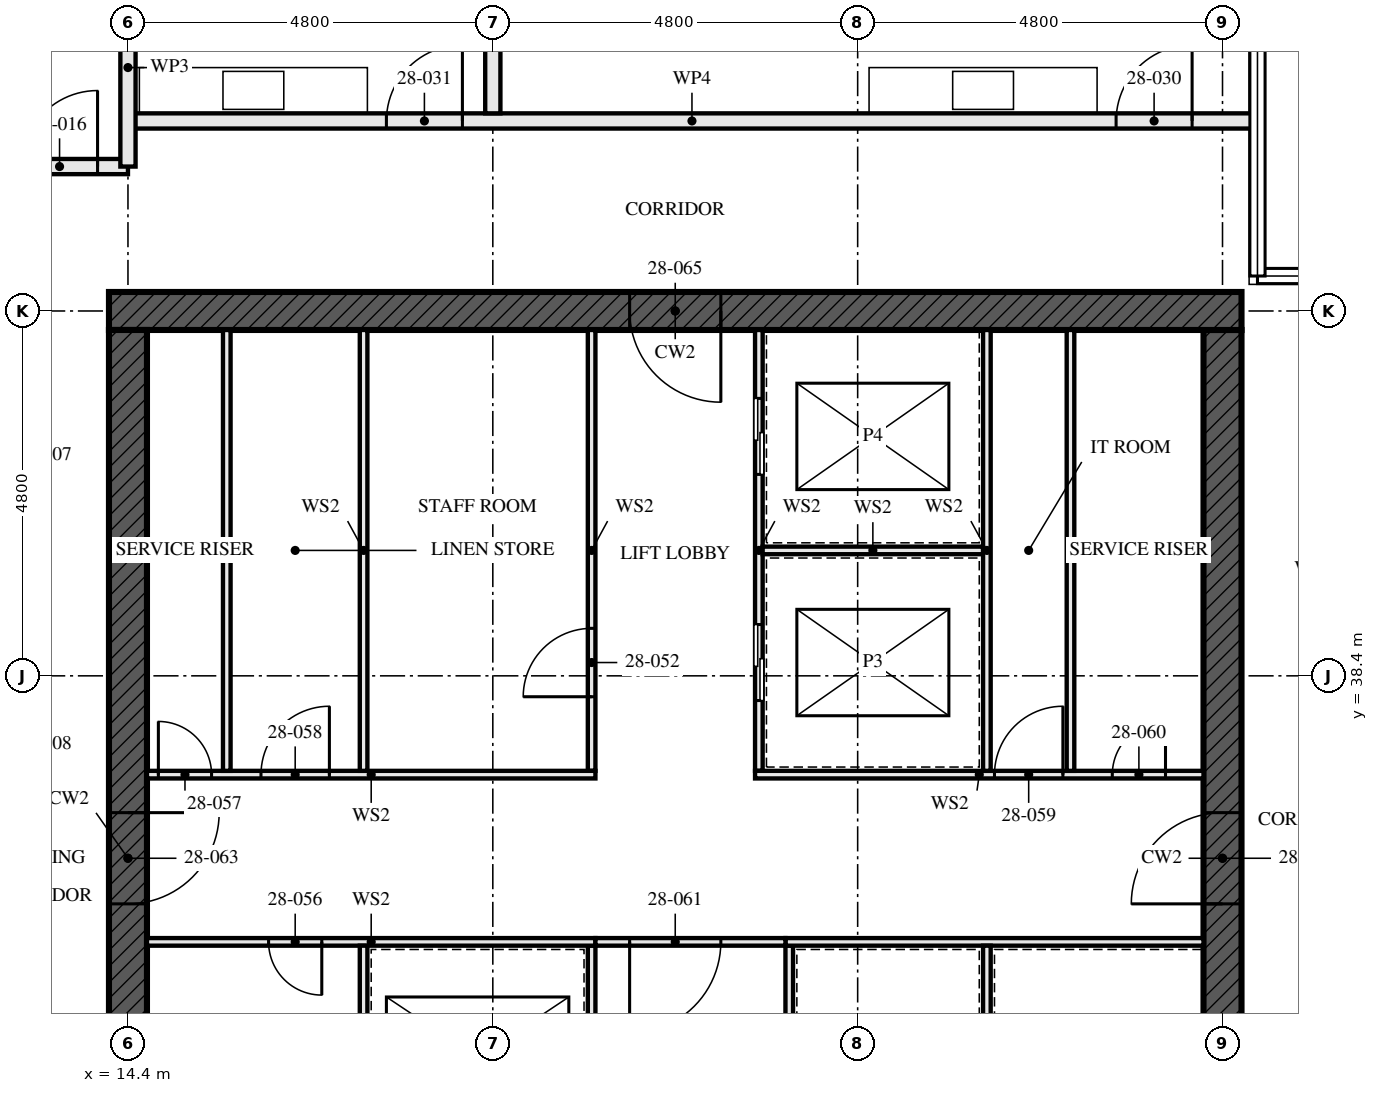
"""IFC4 building model, lengths in metres.
Left out: names, types, materials, properties, quantities, classifications, styles, units other than length and angle.
Written with IfcOpenShell. Run it as: python <this file> out.ifc"""

import sys

from ifc_helpers import new_model, si_unit, direction, frame, frame_2d, origin, place, context, subcontext, project, spatial, rectangle, extrude, element, fill, save


model = new_model("IFC4")
c1 = context("Model", 3, precision=1e-05, world=origin(), true_north=direction((0.0, 1.0)))
c2 = subcontext(c1, "Body", "Model", "MODEL_VIEW")
j1 = project(units=[si_unit("LENGTHUNIT", "METRE"), si_unit("PLANEANGLEUNIT", "RADIAN")], contexts=[c1])
p1 = place(None, origin())
s1 = spatial("IfcSite", under=j1, at=p1, CompositionType="ELEMENT")
p2 = place(p1, origin())
s2 = spatial("IfcBuilding", under=s1, at=p2, CompositionType="ELEMENT")
p3 = place(p2, frame((0.0, 0.0, 105.0)))
s3 = spatial("IfcBuildingStorey", under=s2, at=p3, CompositionType="ELEMENT", Elevation=105.0)
p4 = place(p3, frame((29.05, 43.2, -0.17), z_axis=(0.0, 0.0, 1.0), x_axis=(-1.0, 0.0, 0.0)))
e1 = element("IfcWall", 1, at=p4, inside=s3, PredefinedType="SHEAR", context=c2, shape_type="SweptSolid", body=[
    extrude(rectangle(XDim=14.9, YDim=0.5, at=frame_2d((7.45, 0.0))), origin(), (0.0, 0.0, 1.0), 3.5),
])
p5 = place(p4, frame((6.85, 0.0, 0.17)))
e2 = element("IfcOpeningElement", 2, at=p5, cuts=e1, PredefinedType="OPENING", context=c2, shape_type="SweptSolid", body=[
    extrude(rectangle(XDim=1.2, YDim=2.1, at=frame_2d((0.6, 1.05))), frame((0.0, 0.26, 0.0), z_axis=(0.0, -1.0, 0.0), x_axis=(1.0, 0.0, 0.0)), (0.0, 0.0, 1.0), 0.521),
])
p6 = place(p3, frame((14.4, 42.95, -0.17), z_axis=(0.0, 0.0, 1.0), x_axis=(0.0, -1.0, 0.0)))
e3 = element("IfcWall", 3, at=p6, inside=s3, PredefinedType="SHEAR", context=c2, shape_type="SweptSolid", body=[
    extrude(rectangle(XDim=13.9, YDim=0.5, at=frame_2d((6.95, 0.0))), origin(), (0.0, 0.0, 1.0), 3.5),
])
p7 = place(p6, frame((6.35, 0.0, 0.17)))
e4 = element("IfcOpeningElement", 4, at=p7, cuts=e3, PredefinedType="OPENING", context=c2, shape_type="SweptSolid", body=[
    extrude(rectangle(XDim=1.2, YDim=2.1, at=frame_2d((0.6, 1.05))), frame((0.0, 0.26, 0.0), z_axis=(0.0, -1.0, 0.0), x_axis=(1.0, 0.0, 0.0)), (0.0, 0.0, 1.0), 0.521),
])
p8 = place(p3, frame((28.8, 29.05, -0.17), z_axis=(0.0, 0.0, 1.0), x_axis=(0.0, 1.0, 0.0)))
e5 = element("IfcWall", 5, at=p8, inside=s3, PredefinedType="SHEAR", context=c2, shape_type="SweptSolid", body=[
    extrude(rectangle(XDim=13.9, YDim=0.5, at=frame_2d((6.95, 0.0))), origin(), (0.0, 0.0, 1.0), 3.5),
])
p9 = place(p8, frame((6.35, 0.0, 0.17)))
e6 = element("IfcOpeningElement", 6, at=p9, cuts=e5, PredefinedType="OPENING", context=c2, shape_type="SweptSolid", body=[
    extrude(rectangle(XDim=1.2, YDim=2.1, at=frame_2d((0.6, 1.05))), frame((0.0, 0.26, 0.0), z_axis=(0.0, -1.0, 0.0), x_axis=(1.0, 0.0, 0.0)), (0.0, 0.0, 1.0), 0.521),
])
p10 = place(p3, frame((14.4, 45.1, 0.0), z_axis=(0.0, 0.0, 1.0), x_axis=(-1.0, 0.0, 0.0)))
e7 = element("IfcWall", 7, at=p10, inside=s3, PredefinedType="PARTITIONING", context=c2, shape_type="SweptSolid", body=[
    extrude(rectangle(XDim=9.6, YDim=0.2, at=frame_2d((4.8, 0.0))), origin(), (0.0, 0.0, 1.0), 3.33),
])
p11 = place(p10, frame((0.4, 0.0, 0.0)))
e8 = element("IfcOpeningElement", 8, at=p11, cuts=e7, PredefinedType="OPENING", context=c2, shape_type="SweptSolid", body=[
    extrude(rectangle(XDim=1.0, YDim=2.1, at=frame_2d((0.5, 1.05))), frame((0.0, 0.111, 0.0), z_axis=(0.0, -1.0, 0.0), x_axis=(1.0, 0.0, 0.0)), (0.0, 0.0, 1.0), 0.221),
])
p12 = place(p10, frame((5.2, 0.0, 0.0)))
e9 = element("IfcOpeningElement", 9, at=p12, cuts=e7, PredefinedType="OPENING", context=c2, shape_type="SweptSolid", body=[
    extrude(rectangle(XDim=1.0, YDim=2.1, at=frame_2d((0.5, 1.05))), frame((0.0, 0.111, 0.0), z_axis=(0.0, -1.0, 0.0), x_axis=(1.0, 0.0, 0.0)), (0.0, 0.0, 1.0), 0.221),
])
p13 = place(p3, frame((19.2, 57.28, 0.0), z_axis=(0.0, 0.0, 1.0), x_axis=(0.0, -1.0, 0.0)))
e10 = element("IfcWall", 10, at=p13, inside=s3, PredefinedType="PARTITIONING", context=c2, shape_type="SweptSolid", body=[
    extrude(rectangle(XDim=11.48, YDim=0.2, at=frame_2d((5.74, 0.0))), origin(), (0.0, 0.0, 1.0), 2.55),
])
p14 = place(p3, frame((29.24, 45.7, 0.0), z_axis=(0.0, 0.0, 1.0), x_axis=(-1.0, 0.0, 0.0)))
e11 = element("IfcWall", 11, at=p14, inside=s3, PredefinedType="PARTITIONING", context=c2, shape_type="SweptSolid", body=[
    extrude(rectangle(XDim=14.84, YDim=0.2, at=frame_2d((7.42, 0.0))), origin(), (0.0, 0.0, 1.0), 2.32),
])
p15 = place(p14, frame((0.84, 0.0, 0.0)))
e12 = element("IfcOpeningElement", 12, at=p15, cuts=e11, PredefinedType="OPENING", context=c2, shape_type="SweptSolid", body=[
    extrude(rectangle(XDim=1.0, YDim=2.1, at=frame_2d((0.5, 1.05))), frame((0.0, 0.111, 0.0), z_axis=(0.0, -1.0, 0.0), x_axis=(1.0, 0.0, 0.0)), (0.0, 0.0, 1.0), 0.221),
])
p16 = place(p14, frame((10.44, 0.0, 0.0)))
e13 = element("IfcOpeningElement", 13, at=p16, cuts=e11, PredefinedType="OPENING", context=c2, shape_type="SweptSolid", body=[
    extrude(rectangle(XDim=1.0, YDim=2.1, at=frame_2d((0.5, 1.05))), frame((0.0, 0.111, 0.0), z_axis=(0.0, -1.0, 0.0), x_axis=(1.0, 0.0, 0.0)), (0.0, 0.0, 1.0), 0.221),
])
for number, where, z_axis, x_axis in (
    (14, (15.7, 37.15, 0.0), (0.0, 0.0, 1.0), (0.0, 1.0, 0.0)),
    (15, (26.8, 37.15, 0.0), (0.0, 0.0, 1.0), (0.0, 1.0, 0.0)),
):
    element("IfcWall", number, at=place(p3, frame(where, z_axis=z_axis, x_axis=x_axis)), inside=s3, PredefinedType="SOLIDWALL", context=c2, shape_type="SweptSolid", body=[
        extrude(rectangle(XDim=5.8, YDim=0.1, at=frame_2d((2.9, 0.0))), origin(), (0.0, 0.0, 1.0), 3.33),
    ])
p17 = place(p3, frame((20.5, 29.05, 0.0), z_axis=(0.0, 0.0, 1.0), x_axis=(0.0, 1.0, 0.0)))
e16 = element("IfcWall", 16, at=p17, inside=s3, PredefinedType="SOLIDWALL", context=c2, shape_type="SweptSolid", body=[
    extrude(rectangle(XDim=5.8, YDim=0.1, at=frame_2d((2.9, 0.0))), origin(), (0.0, 0.0, 1.0), 3.33),
])
p18 = place(p17, frame((0.8, 0.0, 0.0)))
e17 = element("IfcOpeningElement", 17, at=p18, cuts=e16, PredefinedType="OPENING", context=c2, shape_type="SweptSolid", body=[
    extrude(rectangle(XDim=1.1, YDim=2.3, at=frame_2d((0.55, 1.15))), frame((0.0, 0.061, 0.0), z_axis=(0.0, -1.0, 0.0), x_axis=(1.0, 0.0, 0.0)), (0.0, 0.0, 1.0), 0.121),
])
p19 = place(p17, frame((3.775, 0.0, 0.0)))
e18 = element("IfcOpeningElement", 18, at=p19, cuts=e16, PredefinedType="OPENING", context=c2, shape_type="SweptSolid", body=[
    extrude(rectangle(XDim=1.1, YDim=2.3, at=frame_2d((0.55, 1.15))), frame((0.0, 0.061, 0.0), z_axis=(0.0, -1.0, 0.0), x_axis=(1.0, 0.0, 0.0)), (0.0, 0.0, 1.0), 0.121),
])
p20 = place(p3, frame((20.5, 37.15, 0.0), z_axis=(0.0, 0.0, 1.0), x_axis=(0.0, 1.0, 0.0)))
e19 = element("IfcWall", 19, at=p20, inside=s3, PredefinedType="SOLIDWALL", context=c2, shape_type="SweptSolid", body=[
    extrude(rectangle(XDim=5.8, YDim=0.1, at=frame_2d((2.9, 0.0))), origin(), (0.0, 0.0, 1.0), 3.33),
])
p21 = place(p20, frame((0.975, 0.0, 0.0)))
e20 = element("IfcOpeningElement", 20, at=p21, cuts=e19, PredefinedType="OPENING", context=c2, shape_type="SweptSolid", body=[
    extrude(rectangle(XDim=0.9, YDim=2.1, at=frame_2d((0.45, 1.05))), frame((0.0, 0.061, 0.0), z_axis=(0.0, -1.0, 0.0), x_axis=(1.0, 0.0, 0.0)), (0.0, 0.0, 1.0), 0.121),
])
p22 = place(p3, frame((22.7, 37.15, 0.0), z_axis=(0.0, 0.0, 1.0), x_axis=(0.0, 1.0, 0.0)))
e21 = element("IfcWall", 21, at=p22, inside=s3, PredefinedType="SOLIDWALL", context=c2, shape_type="SweptSolid", body=[
    extrude(rectangle(XDim=5.8, YDim=0.1, at=frame_2d((2.9, 0.0))), origin(), (0.0, 0.0, 1.0), 3.33),
])
p23 = place(p22, frame((0.925, 0.0, 0.0)))
e22 = element("IfcOpeningElement", 22, at=p23, cuts=e21, PredefinedType="OPENING", context=c2, shape_type="SweptSolid", body=[
    extrude(rectangle(XDim=1.0, YDim=2.1, at=frame_2d((0.5, 1.05))), frame((0.0, 0.061, 0.0), z_axis=(0.0, -1.0, 0.0), x_axis=(1.0, 0.0, 0.0)), (0.0, 0.0, 1.0), 0.121),
])
p24 = place(p22, frame((3.9, 0.0, 0.0)))
e23 = element("IfcOpeningElement", 23, at=p24, cuts=e21, PredefinedType="OPENING", context=c2, shape_type="SweptSolid", body=[
    extrude(rectangle(XDim=1.0, YDim=2.1, at=frame_2d((0.5, 1.05))), frame((0.0, 0.061, 0.0), z_axis=(0.0, -1.0, 0.0), x_axis=(1.0, 0.0, 0.0)), (0.0, 0.0, 1.0), 0.121),
])
p25 = place(p3, frame((23.1, 29.05, 0.0), z_axis=(0.0, 0.0, 1.0), x_axis=(0.0, 1.0, 0.0)))
e24 = element("IfcWall", 24, at=p25, inside=s3, PredefinedType="SOLIDWALL", context=c2, shape_type="SweptSolid", body=[
    extrude(rectangle(XDim=5.8, YDim=0.1, at=frame_2d((2.9, 0.0))), origin(), (0.0, 0.0, 1.0), 3.33),
])
p26 = place(p25, frame((1.0, 0.0, 0.0)))
e25 = element("IfcOpeningElement", 25, at=p26, cuts=e24, PredefinedType="OPENING", context=c2, shape_type="SweptSolid", body=[
    extrude(rectangle(XDim=0.7, YDim=2.1, at=frame_2d((0.35, 1.05))), frame((0.0, 0.061, 0.0), z_axis=(0.0, -1.0, 0.0), x_axis=(1.0, 0.0, 0.0)), (0.0, 0.0, 1.0), 0.121),
])
p27 = place(p3, frame((14.65, 34.9, 0.0), z_axis=(0.0, 0.0, 1.0), x_axis=(1.0, 0.0, 0.0)))
e26 = element("IfcWall", 26, at=p27, inside=s3, PredefinedType="SOLIDWALL", context=c2, shape_type="SweptSolid", body=[
    extrude(rectangle(XDim=5.9, YDim=0.1, at=frame_2d((2.95, 0.0))), origin(), (0.0, 0.0, 1.0), 3.33),
])
p28 = place(p27, frame((1.6, 0.0, 0.0)))
e27 = element("IfcOpeningElement", 27, at=p28, cuts=e26, PredefinedType="OPENING", context=c2, shape_type="SweptSolid", body=[
    extrude(rectangle(XDim=0.7, YDim=2.1, at=frame_2d((0.35, 1.05))), frame((0.0, 0.061, 0.0), z_axis=(0.0, -1.0, 0.0), x_axis=(1.0, 0.0, 0.0)), (0.0, 0.0, 1.0), 0.121),
])
p29 = place(p3, frame((23.05, 34.9, 0.0), z_axis=(0.0, 0.0, 1.0), x_axis=(1.0, 0.0, 0.0)))
e28 = element("IfcWall", 28, at=p29, inside=s3, PredefinedType="SOLIDWALL", context=c2, shape_type="SweptSolid", body=[
    extrude(rectangle(XDim=5.5, YDim=0.1, at=frame_2d((2.75, 0.0))), origin(), (0.0, 0.0, 1.0), 3.33),
])
p30 = place(p3, frame((14.65, 37.1, 0.0), z_axis=(0.0, 0.0, 1.0), x_axis=(1.0, 0.0, 0.0)))
e29 = element("IfcWall", 29, at=p30, inside=s3, PredefinedType="SOLIDWALL", context=c2, shape_type="SweptSolid", body=[
    extrude(rectangle(XDim=5.9, YDim=0.1, at=frame_2d((2.95, 0.0))), origin(), (0.0, 0.0, 1.0), 3.33),
])
p31 = place(p30, frame((0.15, 0.0, 0.0)))
e30 = element("IfcOpeningElement", 30, at=p31, cuts=e29, PredefinedType="OPENING", context=c2, shape_type="SweptSolid", body=[
    extrude(rectangle(XDim=0.7, YDim=2.1, at=frame_2d((0.35, 1.05))), frame((0.0, 0.061, 0.0), z_axis=(0.0, -1.0, 0.0), x_axis=(1.0, 0.0, 0.0)), (0.0, 0.0, 1.0), 0.121),
])
p32 = place(p30, frame((1.5, 0.0, 0.0)))
e31 = element("IfcOpeningElement", 31, at=p32, cuts=e29, PredefinedType="OPENING", context=c2, shape_type="SweptSolid", body=[
    extrude(rectangle(XDim=0.9, YDim=2.1, at=frame_2d((0.45, 1.05))), frame((0.0, 0.061, 0.0), z_axis=(0.0, -1.0, 0.0), x_axis=(1.0, 0.0, 0.0)), (0.0, 0.0, 1.0), 0.121),
])
p33 = place(p3, frame((22.65, 37.1, 0.0), z_axis=(0.0, 0.0, 1.0), x_axis=(1.0, 0.0, 0.0)))
e32 = element("IfcWall", 32, at=p33, inside=s3, PredefinedType="SOLIDWALL", context=c2, shape_type="SweptSolid", body=[
    extrude(rectangle(XDim=5.9, YDim=0.1, at=frame_2d((2.95, 0.0))), origin(), (0.0, 0.0, 1.0), 3.33),
])
p34 = place(p33, frame((3.15, 0.0, 0.0)))
e33 = element("IfcOpeningElement", 33, at=p34, cuts=e32, PredefinedType="OPENING", context=c2, shape_type="SweptSolid", body=[
    extrude(rectangle(XDim=0.9, YDim=2.1, at=frame_2d((0.45, 1.05))), frame((0.0, 0.061, 0.0), z_axis=(0.0, -1.0, 0.0), x_axis=(1.0, 0.0, 0.0)), (0.0, 0.0, 1.0), 0.121),
])
p35 = place(p33, frame((4.7, 0.0, 0.0)))
e34 = element("IfcOpeningElement", 34, at=p35, cuts=e32, PredefinedType="OPENING", context=c2, shape_type="SweptSolid", body=[
    extrude(rectangle(XDim=0.7, YDim=2.1, at=frame_2d((0.35, 1.05))), frame((0.0, 0.061, 0.0), z_axis=(0.0, -1.0, 0.0), x_axis=(1.0, 0.0, 0.0)), (0.0, 0.0, 1.0), 0.121),
])
p36 = place(p3, frame((20.55, 34.9, 0.0), z_axis=(0.0, 0.0, 1.0), x_axis=(1.0, 0.0, 0.0)))
e35 = element("IfcWall", 35, at=p36, inside=s3, PredefinedType="SOLIDWALL", context=c2, shape_type="SweptSolid", body=[
    extrude(rectangle(XDim=2.5, YDim=0.1, at=frame_2d((1.25, 0.0))), origin(), (0.0, 0.0, 1.0), 3.33),
])
p37 = place(p36, frame((0.45, 0.0, 0.0)))
e36 = element("IfcOpeningElement", 36, at=p37, cuts=e35, PredefinedType="OPENING", context=c2, shape_type="SweptSolid", body=[
    extrude(rectangle(XDim=1.2, YDim=2.1, at=frame_2d((0.6, 1.05))), frame((0.0, 0.061, 0.0), z_axis=(0.0, -1.0, 0.0), x_axis=(1.0, 0.0, 0.0)), (0.0, 0.0, 1.0), 0.121),
])
for number, where, z_axis, x_axis in (
    (37, (17.5, 29.05, 0.0), (0.0, 0.0, 1.0), (0.0, 1.0, 0.0)),
    (38, (17.5, 37.15, 0.0), (0.0, 0.0, 1.0), (0.0, 1.0, 0.0)),
):
    element("IfcWall", number, at=place(p3, frame(where, z_axis=z_axis, x_axis=x_axis)), inside=s3, PredefinedType="SOLIDWALL", context=c2, shape_type="SweptSolid", body=[
        extrude(rectangle(XDim=5.8, YDim=0.1, at=frame_2d((2.9, 0.0))), origin(), (0.0, 0.0, 1.0), 3.33),
    ])
p38 = place(p3, frame((22.75, 40.05, 0.0), z_axis=(0.0, 0.0, 1.0), x_axis=(1.0, 0.0, 0.0)))
e39 = element("IfcWall", 39, at=p38, inside=s3, PredefinedType="SOLIDWALL", context=c2, shape_type="SweptSolid", body=[
    extrude(rectangle(XDim=2.9, YDim=0.1, at=frame_2d((1.45, 0.0))), origin(), (0.0, 0.0, 1.0), 3.33),
])
p39 = place(p3, frame((25.7, 37.15, 0.0), z_axis=(0.0, 0.0, 1.0), x_axis=(0.0, 1.0, 0.0)))
e40 = element("IfcWall", 40, at=p39, inside=s3, PredefinedType="SOLIDWALL", context=c2, shape_type="SweptSolid", body=[
    extrude(rectangle(XDim=5.8, YDim=0.1, at=frame_2d((2.9, 0.0))), origin(), (0.0, 0.0, 1.0), 3.33),
])
p40 = place(p3, frame((25.7, 31.95, 0.0), z_axis=(0.0, 0.0, 1.0), x_axis=(0.0, 1.0, 0.0)))
e41 = element("IfcWall", 41, at=p40, inside=s3, PredefinedType="SOLIDWALL", context=c2, shape_type="SweptSolid", body=[
    extrude(rectangle(XDim=2.9, YDim=0.1, at=frame_2d((1.45, 0.0))), origin(), (0.0, 0.0, 1.0), 3.33),
])
p41 = place(p3, frame((14.4, 45.1, 0.0), z_axis=(0.0, 0.0, 1.0), x_axis=(0.0, 1.0, 0.0)))
e42 = element("IfcWall", 42, at=p41, inside=s3, PredefinedType="PARTITIONING", context=c2, shape_type="SweptSolid", body=[
    extrude(rectangle(XDim=2.605, YDim=0.2, at=frame_2d((1.302, 0.0))), origin(), (0.0, 0.0, 1.0), 2.32),
])
p42 = place(p11, frame((1.0, 0.0, 0.0), z_axis=(0.0, 0.0, 1.0), x_axis=(-1.0, 0.0, 0.0)))
e43 = element("IfcDoor", 43, at=p42, inside=s3, OperationType="SINGLE_SWING_LEFT", PredefinedType="DOOR", context=c2, shape_type="SweptSolid", body=[
    extrude(rectangle(XDim=1.0, YDim=2.1, at=frame_2d((0.5, 1.05))), frame((0.0, 0.027, 0.0), z_axis=(0.0, -1.0, 0.0), x_axis=(1.0, 0.0, 0.0)), (0.0, 0.0, 1.0), 0.054),
])
fill(e8, e43)
p43 = place(p15, frame((1.0, 0.0, 0.0), z_axis=(0.0, 0.0, 1.0), x_axis=(-1.0, 0.0, 0.0)))
e44 = element("IfcDoor", 44, at=p43, inside=s3, OperationType="SINGLE_SWING_LEFT", PredefinedType="DOOR", context=c2, shape_type="SweptSolid", body=[
    extrude(rectangle(XDim=1.0, YDim=2.1, at=frame_2d((0.5, 1.05))), frame((0.0, 0.027, 0.0), z_axis=(0.0, -1.0, 0.0), x_axis=(1.0, 0.0, 0.0)), (0.0, 0.0, 1.0), 0.054),
])
fill(e12, e44)
p44 = place(p16, frame((1.0, 0.0, 0.0), z_axis=(0.0, 0.0, 1.0), x_axis=(-1.0, 0.0, 0.0)))
e45 = element("IfcDoor", 45, at=p44, inside=s3, OperationType="SINGLE_SWING_LEFT", PredefinedType="DOOR", context=c2, shape_type="SweptSolid", body=[
    extrude(rectangle(XDim=1.0, YDim=2.1, at=frame_2d((0.5, 1.05))), frame((0.0, 0.027, 0.0), z_axis=(0.0, -1.0, 0.0), x_axis=(1.0, 0.0, 0.0)), (0.0, 0.0, 1.0), 0.054),
])
fill(e13, e45)
p45 = place(p21, origin())
e46 = element("IfcDoor", 46, at=p45, inside=s3, OperationType="SINGLE_SWING_RIGHT", PredefinedType="DOOR", context=c2, shape_type="SweptSolid", body=[
    extrude(rectangle(XDim=0.9, YDim=2.1, at=frame_2d((0.45, 1.05))), frame((0.0, 0.027, 0.0), z_axis=(0.0, -1.0, 0.0), x_axis=(1.0, 0.0, 0.0)), (0.0, 0.0, 1.0), 0.054),
])
fill(e20, e46)
p46 = place(p23, origin())
e47 = element("IfcDoor", 47, at=p46, inside=s3, OperationType="SLIDING_TO_LEFT", PredefinedType="DOOR", context=c2, shape_type="SweptSolid", body=[
    extrude(rectangle(XDim=1.0, YDim=2.1, at=frame_2d((0.5, 1.05))), frame((0.0, 0.05, 0.0), z_axis=(0.0, -1.0, 0.0), x_axis=(1.0, 0.0, 0.0)), (0.0, 0.0, 1.0), 0.1),
])
fill(e22, e47)
p47 = place(p24, origin())
e48 = element("IfcDoor", 48, at=p47, inside=s3, OperationType="SLIDING_TO_LEFT", PredefinedType="DOOR", context=c2, shape_type="SweptSolid", body=[
    extrude(rectangle(XDim=1.0, YDim=2.1, at=frame_2d((0.5, 1.05))), frame((0.0, 0.05, 0.0), z_axis=(0.0, -1.0, 0.0), x_axis=(1.0, 0.0, 0.0)), (0.0, 0.0, 1.0), 0.1),
])
fill(e23, e48)
p48 = place(p28, frame((0.7, 0.0, 0.0), z_axis=(0.0, 0.0, 1.0), x_axis=(-1.0, 0.0, 0.0)))
e49 = element("IfcDoor", 49, at=p48, inside=s3, OperationType="SINGLE_SWING_RIGHT", PredefinedType="DOOR", context=c2, shape_type="SweptSolid", body=[
    extrude(rectangle(XDim=0.7, YDim=2.1, at=frame_2d((0.35, 1.05))), frame((0.0, 0.027, 0.0), z_axis=(0.0, -1.0, 0.0), x_axis=(1.0, 0.0, 0.0)), (0.0, 0.0, 1.0), 0.054),
])
fill(e27, e49)
p49 = place(p31, origin())
e50 = element("IfcDoor", 50, at=p49, inside=s3, OperationType="SINGLE_SWING_RIGHT", PredefinedType="DOOR", context=c2, shape_type="SweptSolid", body=[
    extrude(rectangle(XDim=0.7, YDim=2.1, at=frame_2d((0.35, 1.05))), frame((0.0, 0.027, 0.0), z_axis=(0.0, -1.0, 0.0), x_axis=(1.0, 0.0, 0.0)), (0.0, 0.0, 1.0), 0.054),
])
fill(e30, e50)
p50 = place(p32, origin())
e51 = element("IfcDoor", 51, at=p50, inside=s3, OperationType="SINGLE_SWING_LEFT", PredefinedType="DOOR", context=c2, shape_type="SweptSolid", body=[
    extrude(rectangle(XDim=0.9, YDim=2.1, at=frame_2d((0.45, 1.05))), frame((0.0, 0.027, 0.0), z_axis=(0.0, -1.0, 0.0), x_axis=(1.0, 0.0, 0.0)), (0.0, 0.0, 1.0), 0.054),
])
fill(e31, e51)
p51 = place(p34, origin())
e52 = element("IfcDoor", 52, at=p51, inside=s3, OperationType="SINGLE_SWING_LEFT", PredefinedType="DOOR", context=c2, shape_type="SweptSolid", body=[
    extrude(rectangle(XDim=0.9, YDim=2.1, at=frame_2d((0.45, 1.05))), frame((0.0, 0.027, 0.0), z_axis=(0.0, -1.0, 0.0), x_axis=(1.0, 0.0, 0.0)), (0.0, 0.0, 1.0), 0.054),
])
fill(e33, e52)
p52 = place(p35, origin())
e53 = element("IfcDoor", 53, at=p52, inside=s3, OperationType="SINGLE_SWING_LEFT", PredefinedType="DOOR", context=c2, shape_type="SweptSolid", body=[
    extrude(rectangle(XDim=0.7, YDim=2.1, at=frame_2d((0.35, 1.05))), frame((0.0, 0.027, 0.0), z_axis=(0.0, -1.0, 0.0), x_axis=(1.0, 0.0, 0.0)), (0.0, 0.0, 1.0), 0.054),
])
fill(e34, e53)
p53 = place(p37, frame((1.2, 0.0, 0.0), z_axis=(0.0, 0.0, 1.0), x_axis=(-1.0, 0.0, 0.0)))
e54 = element("IfcDoor", 54, at=p53, inside=s3, OperationType="SINGLE_SWING_LEFT", PredefinedType="DOOR", context=c2, shape_type="SweptSolid", body=[
    extrude(rectangle(XDim=1.2, YDim=2.1, at=frame_2d((0.6, 1.05))), frame((0.0, 0.027, 0.0), z_axis=(0.0, -1.0, 0.0), x_axis=(1.0, 0.0, 0.0)), (0.0, 0.0, 1.0), 0.054),
])
fill(e36, e54)
p54 = place(p7, origin())
e55 = element("IfcDoor", 55, at=p54, inside=s3, OperationType="SINGLE_SWING_LEFT", PredefinedType="DOOR", context=c2, shape_type="SweptSolid", body=[
    extrude(rectangle(XDim=1.2, YDim=2.1, at=frame_2d((0.6, 1.05))), frame((0.0, 0.027, 0.0), z_axis=(0.0, -1.0, 0.0), x_axis=(1.0, 0.0, 0.0)), (0.0, 0.0, 1.0), 0.054),
])
fill(e4, e55)
p55 = place(p9, origin())
e56 = element("IfcDoor", 56, at=p55, inside=s3, OperationType="SINGLE_SWING_LEFT", PredefinedType="DOOR", context=c2, shape_type="SweptSolid", body=[
    extrude(rectangle(XDim=1.2, YDim=2.1, at=frame_2d((0.6, 1.05))), frame((0.0, 0.027, 0.0), z_axis=(0.0, -1.0, 0.0), x_axis=(1.0, 0.0, 0.0)), (0.0, 0.0, 1.0), 0.054),
])
fill(e6, e56)
p56 = place(p5, origin())
e57 = element("IfcDoor", 57, at=p56, inside=s3, OperationType="SINGLE_SWING_LEFT", PredefinedType="DOOR", context=c2, shape_type="SweptSolid", body=[
    extrude(rectangle(XDim=1.2, YDim=2.1, at=frame_2d((0.6, 1.05))), frame((0.0, 0.027, 0.0), z_axis=(0.0, -1.0, 0.0), x_axis=(1.0, 0.0, 0.0)), (0.0, 0.0, 1.0), 0.054),
])
fill(e2, e57)
save(model, sys.argv[1])
